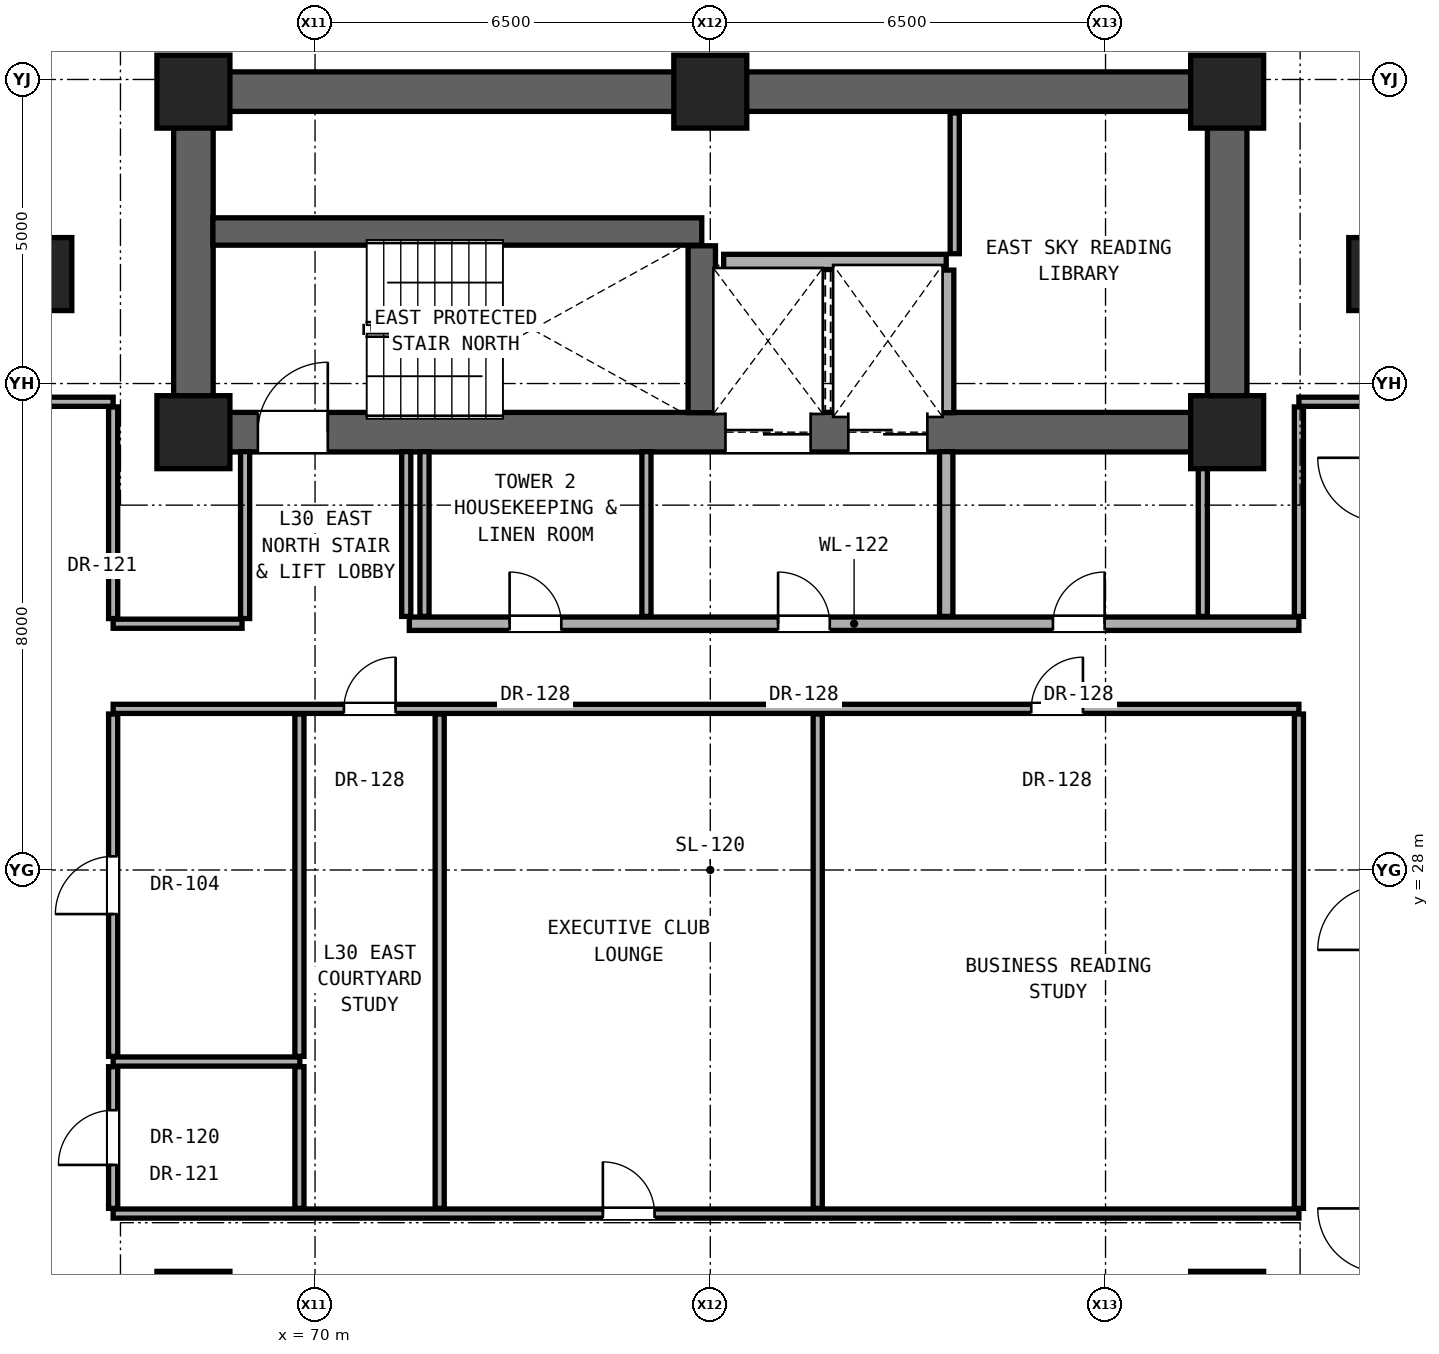
"""IFC4 building model, lengths in metres.
Left out: names, types, materials, properties, quantities, classifications, styles, units other than length and angle.
Written with IfcOpenShell. Run it as: python <this file> out.ifc"""

import sys

from ifc_helpers import new_model, si_unit, direction, frame, frame_2d, origin, origin_2d, place, context, subcontext, project, spatial, rectangle, extrude, element, fill, save


model = new_model("IFC4")
c1 = context("Model", 3, precision=1e-05, world=origin(), true_north=direction((0.0, 1.0)))
c2 = subcontext(c1, "Body", "Model", "MODEL_VIEW")
j1 = project(units=[si_unit("LENGTHUNIT", "METRE"), si_unit("PLANEANGLEUNIT", "RADIAN")], contexts=[c1])
p1 = place(None, origin())
s1 = spatial("IfcSite", under=j1, at=p1, CompositionType="ELEMENT")
p2 = place(p1, origin())
s2 = spatial("IfcBuilding", under=s1, at=p2, CompositionType="ELEMENT")
p3 = place(p2, frame((0.0, 0.0, 108.2)))
s3 = spatial("IfcBuildingStorey", under=s2, at=p3, CompositionType="ELEMENT", Elevation=108.2)
for number, where, z_axis, x_axis in (
    (1, (68.0, 20.8, 0.0), (0.0, 0.0, 1.0), (1.0, 0.0, 0.0)),
    (2, (85.0, 20.8, 0.0), (0.0, 0.0, 1.0), (1.0, 0.0, 0.0)),
    (3, (68.0, 35.2, 0.0), (0.0, 0.0, 1.0), (1.0, 0.0, 0.0)),
    (4, (85.0, 35.2, 0.0), (0.0, 0.0, 1.0), (1.0, 0.0, 0.0)),
    (5, (68.0, 40.8, 0.0), (0.0, 0.0, 1.0), (1.0, 0.0, 0.0)),
    (6, (76.5, 40.8, 0.0), (0.0, 0.0, 1.0), (1.0, 0.0, 0.0)),
    (7, (85.0, 40.8, 0.0), (0.0, 0.0, 1.0), (1.0, 0.0, 0.0)),
):
    element("IfcColumn", number, at=place(p3, frame(where, z_axis=z_axis, x_axis=x_axis)), inside=s3, PredefinedType="COLUMN", context=c2, shape_type="SweptSolid", body=[
        extrude(rectangle(XDim=1.2, YDim=1.2, at=origin_2d()), origin(), (0.0, 0.0, 1.0), 3.3),
    ])
for number, where, z_axis, x_axis in (
    (8, (65.6, 37.8, 0.0), (0.0, 0.0, 1.0), (1.0, 0.0, 0.0)),
    (9, (87.4, 37.8, 0.0), (0.0, 0.0, 1.0), (1.0, 0.0, 0.0)),
):
    element("IfcColumn", number, at=place(p3, frame(where, z_axis=z_axis, x_axis=x_axis)), inside=s3, PredefinedType="PILASTER", context=c2, shape_type="SweptSolid", body=[
        extrude(rectangle(XDim=0.8, YDim=1.2, at=origin_2d()), origin(), (0.0, 0.0, 1.0), 3.3),
    ])
p4 = place(p3, frame((68.0, 40.8, 0.0), z_axis=(0.0, 0.0, 1.0), x_axis=(1.0, 0.0, 0.0)))
e10 = element("IfcWall", 10, at=p4, inside=s3, PredefinedType="SHEAR", context=c2, shape_type="SweptSolid", body=[
    extrude(rectangle(XDim=17.0, YDim=0.65, at=frame_2d((8.5, 0.0))), origin(), (0.0, 0.0, 1.0), 3.08),
])
for number, where, z_axis, x_axis in (
    (11, (68.0, 35.2, 0.0), (0.0, 0.0, 1.0), (0.0, 1.0, 0.0)),
    (12, (85.0, 35.2, 0.0), (0.0, 0.0, 1.0), (0.0, 1.0, 0.0)),
):
    element("IfcWall", number, at=place(p3, frame(where, z_axis=z_axis, x_axis=x_axis)), inside=s3, PredefinedType="SHEAR", context=c2, shape_type="SweptSolid", body=[
        extrude(rectangle(XDim=5.6, YDim=0.65, at=frame_2d((2.8, 0.0))), origin(), (0.0, 0.0, 1.0), 3.08),
    ])
p5 = place(p3, frame((68.0, 35.2, 0.0), z_axis=(0.0, 0.0, 1.0), x_axis=(1.0, 0.0, 0.0)))
e13 = element("IfcWall", 13, at=p5, inside=s3, PredefinedType="SHEAR", context=c2, shape_type="SweptSolid", body=[
    extrude(rectangle(XDim=17.0, YDim=0.65, at=frame_2d((8.5, 0.0))), origin(), (0.0, 0.0, 1.0), 3.08),
])
p6 = place(p5, frame((1.06, 0.0, 0.0)))
e14 = element("IfcOpeningElement", 14, at=p6, cuts=e13, PredefinedType="OPENING", context=c2, shape_type="SweptSolid", body=[
    extrude(rectangle(XDim=1.15, YDim=2.2, at=frame_2d((0.575, 1.1))), frame((0.0, 0.335, 0.0), z_axis=(0.0, -1.0, 0.0), x_axis=(1.0, 0.0, 0.0)), (0.0, 0.0, 1.0), 0.67),
])
p7 = place(p5, frame((8.75, 0.0, 0.0)))
e15 = element("IfcOpeningElement", 15, at=p7, cuts=e13, PredefinedType="OPENING", context=c2, shape_type="SweptSolid", body=[
    extrude(rectangle(XDim=1.4, YDim=2.35, at=frame_2d((0.7, 1.175))), frame((0.0, 0.335, 0.0), z_axis=(0.0, -1.0, 0.0), x_axis=(1.0, 0.0, 0.0)), (0.0, 0.0, 1.0), 0.67),
])
p8 = place(p5, frame((10.77, 0.0, 0.0)))
e16 = element("IfcOpeningElement", 16, at=p8, cuts=e13, PredefinedType="OPENING", context=c2, shape_type="SweptSolid", body=[
    extrude(rectangle(XDim=1.3, YDim=2.3, at=frame_2d((0.65, 1.15))), frame((0.0, 0.335, 0.0), z_axis=(0.0, -1.0, 0.0), x_axis=(1.0, 0.0, 0.0)), (0.0, 0.0, 1.0), 0.67),
])
p9 = place(p3, frame((66.68, 22.35, 0.0), z_axis=(0.0, 0.0, 1.0), x_axis=(1.0, 0.0, 0.0)))
e17 = element("IfcWall", 17, at=p9, inside=s3, PredefinedType="PARTITIONING", context=c2, shape_type="SweptSolid", body=[
    extrude(rectangle(XDim=19.5, YDim=0.15, at=frame_2d((9.75, 0.0))), origin(), (0.0, 0.0, 1.0), 2.145),
])
p10 = place(p9, frame((8.053, 0.0, 0.0)))
e18 = element("IfcOpeningElement", 18, at=p10, cuts=e17, PredefinedType="OPENING", context=c2, shape_type="SweptSolid", body=[
    extrude(rectangle(XDim=0.85, YDim=2.01, at=frame_2d((0.425, 1.005))), frame((0.0, 0.085, 0.0), z_axis=(0.0, -1.0, 0.0), x_axis=(1.0, 0.0, 0.0)), (0.0, 0.0, 1.0), 0.17),
])
p11 = place(p3, frame((66.68, 24.85, 0.0), z_axis=(0.0, 0.0, 1.0), x_axis=(1.0, 0.0, 0.0)))
e19 = element("IfcWall", 19, at=p11, inside=s3, PredefinedType="PARTITIONING", context=c2, shape_type="SweptSolid", body=[
    extrude(rectangle(XDim=3.07, YDim=0.15, at=frame_2d((1.535, 0.0))), origin(), (0.0, 0.0, 1.0), 2.145),
])
p12 = place(p3, frame((66.68, 30.65, 0.0), z_axis=(0.0, 0.0, 1.0), x_axis=(1.0, 0.0, 0.0)))
e20 = element("IfcWall", 20, at=p12, inside=s3, PredefinedType="PARTITIONING", context=c2, shape_type="SweptSolid", body=[
    extrude(rectangle(XDim=19.5, YDim=0.15, at=frame_2d((9.75, 0.0))), origin(), (0.0, 0.0, 1.0), 2.145),
])
p13 = place(p12, frame((3.795, 0.0, 0.0)))
e21 = element("IfcOpeningElement", 21, at=p13, cuts=e20, PredefinedType="OPENING", context=c2, shape_type="SweptSolid", body=[
    extrude(rectangle(XDim=0.85, YDim=2.01, at=frame_2d((0.425, 1.005))), frame((0.0, 0.085, 0.0), z_axis=(0.0, -1.0, 0.0), x_axis=(1.0, 0.0, 0.0)), (0.0, 0.0, 1.0), 0.17),
])
p14 = place(p12, frame((15.098, 0.0, 0.0)))
e22 = element("IfcOpeningElement", 22, at=p14, cuts=e20, PredefinedType="OPENING", context=c2, shape_type="SweptSolid", body=[
    extrude(rectangle(XDim=0.85, YDim=2.01, at=frame_2d((0.425, 1.005))), frame((0.0, 0.085, 0.0), z_axis=(0.0, -1.0, 0.0), x_axis=(1.0, 0.0, 0.0)), (0.0, 0.0, 1.0), 0.17),
])
p15 = place(p3, frame((66.68, 32.05, 0.0), z_axis=(0.0, 0.0, 1.0), x_axis=(1.0, 0.0, 0.0)))
e23 = element("IfcWall", 23, at=p15, inside=s3, PredefinedType="PARTITIONING", context=c2, shape_type="SweptSolid", body=[
    extrude(rectangle(XDim=2.12, YDim=0.15, at=frame_2d((1.06, 0.0))), origin(), (0.0, 0.0, 1.0), 2.145),
])
p16 = place(p3, frame((71.55, 32.05, 0.0), z_axis=(0.0, 0.0, 1.0), x_axis=(1.0, 0.0, 0.0)))
e24 = element("IfcWall", 24, at=p16, inside=s3, PredefinedType="SOLIDWALL", context=c2, shape_type="SweptSolid", body=[
    extrude(rectangle(XDim=14.63, YDim=0.22, at=frame_2d((7.315, 0.0))), origin(), (0.0, 0.0, 1.0), 2.145),
])
p17 = place(p16, frame((6.065, 0.0, 0.0)))
e25 = element("IfcOpeningElement", 25, at=p17, cuts=e24, PredefinedType="OPENING", context=c2, shape_type="SweptSolid", body=[
    extrude(rectangle(XDim=0.85, YDim=2.01, at=frame_2d((0.425, 1.005))), frame((0.0, 0.12, 0.0), z_axis=(0.0, -1.0, 0.0), x_axis=(1.0, 0.0, 0.0)), (0.0, 0.0, 1.0), 0.24),
])
p18 = place(p16, frame((10.585, 0.0, 0.0)))
e26 = element("IfcOpeningElement", 26, at=p18, cuts=e24, PredefinedType="OPENING", context=c2, shape_type="SweptSolid", body=[
    extrude(rectangle(XDim=0.85, YDim=2.01, at=frame_2d((0.425, 1.005))), frame((0.0, 0.12, 0.0), z_axis=(0.0, -1.0, 0.0), x_axis=(1.0, 0.0, 0.0)), (0.0, 0.0, 1.0), 0.24),
])
p19 = place(p16, frame((1.65, 0.0, 0.0)))
e27 = element("IfcOpeningElement", 27, at=p19, cuts=e24, PredefinedType="OPENING", context=c2, shape_type="SweptSolid", body=[
    extrude(rectangle(XDim=0.85, YDim=2.01, at=frame_2d((0.425, 1.005))), frame((0.0, 0.12, 0.0), z_axis=(0.0, -1.0, 0.0), x_axis=(1.0, 0.0, 0.0)), (0.0, 0.0, 1.0), 0.24),
])
p20 = place(p3, frame((65.32, 35.7, 0.0), z_axis=(0.0, 0.0, 1.0), x_axis=(1.0, 0.0, 0.0)))
e28 = element("IfcWall", 28, at=p20, inside=s3, PredefinedType="PARTITIONING", context=c2, shape_type="SweptSolid", body=[
    extrude(rectangle(XDim=1.36, YDim=0.15, at=frame_2d((0.68, 0.0))), origin(), (0.0, 0.0, 1.0), 3.08),
])
p21 = place(p3, frame((86.18, 35.7, 0.0), z_axis=(0.0, 0.0, 1.0), x_axis=(1.0, 0.0, 0.0)))
e29 = element("IfcWall", 29, at=p21, inside=s3, PredefinedType="PARTITIONING", context=c2, shape_type="SweptSolid", body=[
    extrude(rectangle(XDim=1.36, YDim=0.15, at=frame_2d((0.68, 0.0))), origin(), (0.0, 0.0, 1.0), 3.08),
])
p22 = place(p3, frame((76.72, 38.0, 0.0), z_axis=(0.0, 0.0, 1.0), x_axis=(1.0, 0.0, 0.0)))
e30 = element("IfcWall", 30, at=p22, inside=s3, PredefinedType="SOLIDWALL", context=c2, shape_type="SweptSolid", body=[
    extrude(rectangle(XDim=3.66, YDim=0.25, at=frame_2d((1.83, 0.0))), origin(), (0.0, 0.0, 1.0), 3.08),
])
p23 = place(p3, frame((68.32, 38.5, 0.0), z_axis=(0.0, 0.0, 1.0), x_axis=(1.0, 0.0, 0.0)))
e31 = element("IfcWall", 31, at=p23, inside=s3, PredefinedType="SHEAR", context=c2, shape_type="SweptSolid", body=[
    extrude(rectangle(XDim=8.04, YDim=0.45, at=frame_2d((4.02, 0.0))), origin(), (0.0, 0.0, 1.0), 3.08),
])
p24 = place(p3, frame((66.68, 22.435, 0.0), z_axis=(0.0, 0.0, 1.0), x_axis=(0.0, 1.0, 0.0)))
e32 = element("IfcWall", 32, at=p24, inside=s3, PredefinedType="PARTITIONING", context=c2, shape_type="SweptSolid", body=[
    extrude(rectangle(XDim=2.33, YDim=0.15, at=frame_2d((1.165, 0.0))), origin(), (0.0, 0.0, 1.0), 3.08),
])
p25 = place(p24, frame((0.715, 0.0, 0.0)))
e33 = element("IfcOpeningElement", 33, at=p25, cuts=e32, PredefinedType="OPENING", context=c2, shape_type="SweptSolid", body=[
    extrude(rectangle(XDim=0.9, YDim=2.1, at=frame_2d((0.45, 1.05))), frame((0.0, 0.085, 0.0), z_axis=(0.0, -1.0, 0.0), x_axis=(1.0, 0.0, 0.0)), (0.0, 0.0, 1.0), 0.17),
])
p26 = place(p3, frame((66.68, 24.935, 0.0), z_axis=(0.0, 0.0, 1.0), x_axis=(0.0, 1.0, 0.0)))
e34 = element("IfcWall", 34, at=p26, inside=s3, PredefinedType="PARTITIONING", context=c2, shape_type="SweptSolid", body=[
    extrude(rectangle(XDim=5.63, YDim=0.15, at=frame_2d((2.815, 0.0))), origin(), (0.0, 0.0, 1.0), 2.299),
])
p27 = place(p26, frame((2.34, 0.0, 0.0)))
e35 = element("IfcOpeningElement", 35, at=p27, cuts=e34, PredefinedType="OPENING", context=c2, shape_type="SweptSolid", body=[
    extrude(rectangle(XDim=0.95, YDim=2.15, at=frame_2d((0.475, 1.075))), frame((0.0, 0.085, 0.0), z_axis=(0.0, -1.0, 0.0), x_axis=(1.0, 0.0, 0.0)), (0.0, 0.0, 1.0), 0.17),
])
p28 = place(p3, frame((66.68, 32.135, 0.0), z_axis=(0.0, 0.0, 1.0), x_axis=(0.0, 1.0, 0.0)))
e36 = element("IfcWall", 36, at=p28, inside=s3, PredefinedType="PARTITIONING", context=c2, shape_type="SweptSolid", body=[
    extrude(rectangle(XDim=3.48, YDim=0.15, at=frame_2d((1.74, 0.0))), origin(), (0.0, 0.0, 1.0), 2.472),
])
p29 = place(p3, frame((68.85, 32.135, 0.0), z_axis=(0.0, 0.0, 1.0), x_axis=(0.0, 1.0, 0.0)))
e37 = element("IfcWall", 37, at=p29, inside=s3, PredefinedType="PARTITIONING", context=c2, shape_type="SweptSolid", body=[
    extrude(rectangle(XDim=2.745, YDim=0.15, at=frame_2d((1.373, 0.0))), origin(), (0.0, 0.0, 1.0), 3.08),
])
p30 = place(p3, frame((69.743, 22.435, 0.0), z_axis=(0.0, 0.0, 1.0), x_axis=(0.0, 1.0, 0.0)))
e38 = element("IfcWall", 38, at=p30, inside=s3, PredefinedType="PARTITIONING", context=c2, shape_type="SweptSolid", body=[
    extrude(rectangle(XDim=2.33, YDim=0.15, at=frame_2d((1.165, 0.0))), origin(), (0.0, 0.0, 1.0), 3.08),
])
p31 = place(p3, frame((69.743, 24.935, 0.0), z_axis=(0.0, 0.0, 1.0), x_axis=(0.0, 1.0, 0.0)))
e39 = element("IfcWall", 39, at=p31, inside=s3, PredefinedType="PARTITIONING", context=c2, shape_type="SweptSolid", body=[
    extrude(rectangle(XDim=5.63, YDim=0.15, at=frame_2d((2.815, 0.0))), origin(), (0.0, 0.0, 1.0), 2.145),
])
for number, where, z_axis, x_axis in (
    (40, (71.5, 32.17, 0.0), (0.0, 0.0, 1.0), (0.0, 1.0, 0.0)),
    (41, (71.8, 32.17, 0.0), (0.0, 0.0, 1.0), (0.0, 1.0, 0.0)),
):
    element("IfcWall", number, at=place(p3, frame(where, z_axis=z_axis, x_axis=x_axis)), inside=s3, PredefinedType="PARTITIONING", context=c2, shape_type="SweptSolid", body=[
        extrude(rectangle(XDim=2.71, YDim=0.15, at=frame_2d((1.355, 0.0))), origin(), (0.0, 0.0, 1.0), 3.08),
    ])
p32 = place(p3, frame((72.05, 22.435, 0.0), z_axis=(0.0, 0.0, 1.0), x_axis=(0.0, 1.0, 0.0)))
e42 = element("IfcWall", 42, at=p32, inside=s3, PredefinedType="PARTITIONING", context=c2, shape_type="SweptSolid", body=[
    extrude(rectangle(XDim=8.13, YDim=0.15, at=frame_2d((4.065, 0.0))), origin(), (0.0, 0.0, 1.0), 2.145),
])
p33 = place(p3, frame((75.45, 32.17, 0.0), z_axis=(0.0, 0.0, 1.0), x_axis=(0.0, 1.0, 0.0)))
e43 = element("IfcWall", 43, at=p33, inside=s3, PredefinedType="PARTITIONING", context=c2, shape_type="SweptSolid", body=[
    extrude(rectangle(XDim=2.71, YDim=0.15, at=frame_2d((1.355, 0.0))), origin(), (0.0, 0.0, 1.0), 3.08),
])
p34 = place(p3, frame((76.36, 35.52, 0.0), z_axis=(0.0, 0.0, 1.0), x_axis=(0.0, 1.0, 0.0)))
e44 = element("IfcWall", 44, at=p34, inside=s3, PredefinedType="SHEAR", context=c2, shape_type="SweptSolid", body=[
    extrude(rectangle(XDim=2.745, YDim=0.45, at=frame_2d((1.373, 0.0))), origin(), (0.0, 0.0, 1.0), 3.08),
])
p35 = place(p3, frame((78.267, 22.435, 0.0), z_axis=(0.0, 0.0, 1.0), x_axis=(0.0, 1.0, 0.0)))
e45 = element("IfcWall", 45, at=p35, inside=s3, PredefinedType="PARTITIONING", context=c2, shape_type="SweptSolid", body=[
    extrude(rectangle(XDim=8.13, YDim=0.15, at=frame_2d((4.065, 0.0))), origin(), (0.0, 0.0, 1.0), 2.145),
])
p36 = place(p3, frame((80.38, 32.17, 0.0), z_axis=(0.0, 0.0, 1.0), x_axis=(0.0, 1.0, 0.0)))
e46 = element("IfcWall", 46, at=p36, inside=s3, PredefinedType="SOLIDWALL", context=c2, shape_type="SweptSolid", body=[
    extrude(rectangle(XDim=2.71, YDim=0.22, at=frame_2d((1.355, 0.0))), origin(), (0.0, 0.0, 1.0), 3.08),
])
p37 = place(p3, frame((80.38, 35.52, 0.0), z_axis=(0.0, 0.0, 1.0), x_axis=(0.0, 1.0, 0.0)))
e47 = element("IfcWall", 47, at=p37, inside=s3, PredefinedType="SOLIDWALL", context=c2, shape_type="SweptSolid", body=[
    extrude(rectangle(XDim=2.345, YDim=0.25, at=frame_2d((1.172, 0.0))), origin(), (0.0, 0.0, 1.0), 3.08),
])
p38 = place(p3, frame((80.52, 38.135, 0.0), z_axis=(0.0, 0.0, 1.0), x_axis=(0.0, 1.0, 0.0)))
e48 = element("IfcWall", 48, at=p38, inside=s3, PredefinedType="PARTITIONING", context=c2, shape_type="SweptSolid", body=[
    extrude(rectangle(XDim=2.315, YDim=0.15, at=frame_2d((1.157, 0.0))), origin(), (0.0, 0.0, 1.0), 3.08),
])
p39 = place(p3, frame((84.6, 32.17, 0.0), z_axis=(0.0, 0.0, 1.0), x_axis=(0.0, 1.0, 0.0)))
e49 = element("IfcWall", 49, at=p39, inside=s3, PredefinedType="PARTITIONING", context=c2, shape_type="SweptSolid", body=[
    extrude(rectangle(XDim=2.71, YDim=0.15, at=frame_2d((1.355, 0.0))), origin(), (0.0, 0.0, 1.0), 3.08),
])
p40 = place(p3, frame((86.18, 22.435, 0.0), z_axis=(0.0, 0.0, 1.0), x_axis=(0.0, 1.0, 0.0)))
e50 = element("IfcWall", 50, at=p40, inside=s3, PredefinedType="PARTITIONING", context=c2, shape_type="SweptSolid", body=[
    extrude(rectangle(XDim=8.13, YDim=0.15, at=frame_2d((4.065, 0.0))), origin(), (0.0, 0.0, 1.0), 2.299),
])
p41 = place(p3, frame((86.18, 32.17, 0.0), z_axis=(0.0, 0.0, 1.0), x_axis=(0.0, 1.0, 0.0)))
e51 = element("IfcWall", 51, at=p41, inside=s3, PredefinedType="PARTITIONING", context=c2, shape_type="SweptSolid", body=[
    extrude(rectangle(XDim=3.445, YDim=0.15, at=frame_2d((1.723, 0.0))), origin(), (0.0, 0.0, 1.0), 2.472),
])
p42 = place(p6, origin())
e52 = element("IfcDoor", 52, at=p42, inside=s3, OperationType="SINGLE_SWING_RIGHT", PredefinedType="DOOR", context=c2, shape_type="SweptSolid", body=[
    extrude(rectangle(XDim=1.15, YDim=2.2, at=frame_2d((0.575, 1.1))), frame((0.0, 0.025, 0.0), z_axis=(0.0, -1.0, 0.0), x_axis=(1.0, 0.0, 0.0)), (0.0, 0.0, 1.0), 0.05),
])
fill(e14, e52)
p43 = place(p17, origin())
e53 = element("IfcDoor", 53, at=p43, inside=s3, OperationType="SINGLE_SWING_LEFT", PredefinedType="DOOR", context=c2, shape_type="SweptSolid", body=[
    extrude(rectangle(XDim=0.85, YDim=2.01, at=frame_2d((0.425, 1.005))), frame((0.0, 0.025, 0.0), z_axis=(0.0, -1.0, 0.0), x_axis=(1.0, 0.0, 0.0)), (0.0, 0.0, 1.0), 0.05),
])
fill(e25, e53)
p44 = place(p18, origin())
e54 = element("IfcDoor", 54, at=p44, inside=s3, OperationType="SINGLE_SWING_RIGHT", PredefinedType="DOOR", context=c2, shape_type="SweptSolid", body=[
    extrude(rectangle(XDim=0.85, YDim=2.01, at=frame_2d((0.425, 1.005))), frame((0.0, 0.025, 0.0), z_axis=(0.0, -1.0, 0.0), x_axis=(1.0, 0.0, 0.0)), (0.0, 0.0, 1.0), 0.05),
])
fill(e26, e54)
p45 = place(p19, origin())
e55 = element("IfcDoor", 55, at=p45, inside=s3, OperationType="SINGLE_SWING_LEFT", PredefinedType="DOOR", context=c2, shape_type="SweptSolid", body=[
    extrude(rectangle(XDim=0.85, YDim=2.01, at=frame_2d((0.425, 1.005))), frame((0.0, 0.025, 0.0), z_axis=(0.0, -1.0, 0.0), x_axis=(1.0, 0.0, 0.0)), (0.0, 0.0, 1.0), 0.05),
])
fill(e27, e55)
p46 = place(p25, origin())
e56 = element("IfcDoor", 56, at=p46, inside=s3, OperationType="SINGLE_SWING_LEFT", PredefinedType="DOOR", context=c2, shape_type="SweptSolid", body=[
    extrude(rectangle(XDim=0.9, YDim=2.1, at=frame_2d((0.45, 1.05))), frame((0.0, 0.025, 0.0), z_axis=(0.0, -1.0, 0.0), x_axis=(1.0, 0.0, 0.0)), (0.0, 0.0, 1.0), 0.05),
])
fill(e33, e56)
p47 = place(p27, origin())
e57 = element("IfcDoor", 57, at=p47, inside=s3, OperationType="SINGLE_SWING_LEFT", PredefinedType="DOOR", context=c2, shape_type="SweptSolid", body=[
    extrude(rectangle(XDim=0.95, YDim=2.15, at=frame_2d((0.475, 1.075))), frame((0.0, 0.025, 0.0), z_axis=(0.0, -1.0, 0.0), x_axis=(1.0, 0.0, 0.0)), (0.0, 0.0, 1.0), 0.05),
])
fill(e35, e57)
p48 = place(p13, origin())
e58 = element("IfcDoor", 58, at=p48, inside=s3, OperationType="SINGLE_SWING_RIGHT", PredefinedType="DOOR", context=c2, shape_type="SweptSolid", body=[
    extrude(rectangle(XDim=0.85, YDim=2.01, at=frame_2d((0.425, 1.005))), frame((0.0, 0.025, 0.0), z_axis=(0.0, -1.0, 0.0), x_axis=(1.0, 0.0, 0.0)), (0.0, 0.0, 1.0), 0.05),
])
fill(e21, e58)
p49 = place(p10, origin())
e59 = element("IfcDoor", 59, at=p49, inside=s3, OperationType="SINGLE_SWING_LEFT", PredefinedType="DOOR", context=c2, shape_type="SweptSolid", body=[
    extrude(rectangle(XDim=0.85, YDim=2.01, at=frame_2d((0.425, 1.005))), frame((0.0, 0.025, 0.0), z_axis=(0.0, -1.0, 0.0), x_axis=(1.0, 0.0, 0.0)), (0.0, 0.0, 1.0), 0.05),
])
fill(e18, e59)
p50 = place(p14, origin())
e60 = element("IfcDoor", 60, at=p50, inside=s3, OperationType="SINGLE_SWING_RIGHT", PredefinedType="DOOR", context=c2, shape_type="SweptSolid", body=[
    extrude(rectangle(XDim=0.85, YDim=2.01, at=frame_2d((0.425, 1.005))), frame((0.0, 0.025, 0.0), z_axis=(0.0, -1.0, 0.0), x_axis=(1.0, 0.0, 0.0)), (0.0, 0.0, 1.0), 0.05),
])
fill(e22, e60)
p51 = place(p7, origin())
e61 = element("IfcDoor", 61, at=p51, inside=s3, OperationType="DOUBLE_DOOR_SLIDING", PredefinedType="DOOR", context=c2, shape_type="SweptSolid", body=[
    extrude(rectangle(XDim=1.4, YDim=2.35, at=frame_2d((0.7, 1.175))), frame((0.0, 0.025, 0.0), z_axis=(0.0, -1.0, 0.0), x_axis=(1.0, 0.0, 0.0)), (0.0, 0.0, 1.0), 0.05),
])
fill(e15, e61)
p52 = place(p8, origin())
e62 = element("IfcDoor", 62, at=p52, inside=s3, OperationType="DOUBLE_DOOR_SLIDING", PredefinedType="DOOR", context=c2, shape_type="SweptSolid", body=[
    extrude(rectangle(XDim=1.3, YDim=2.3, at=frame_2d((0.65, 1.15))), frame((0.0, 0.025, 0.0), z_axis=(0.0, -1.0, 0.0), x_axis=(1.0, 0.0, 0.0)), (0.0, 0.0, 1.0), 0.05),
])
fill(e16, e62)
save(model, sys.argv[1])
